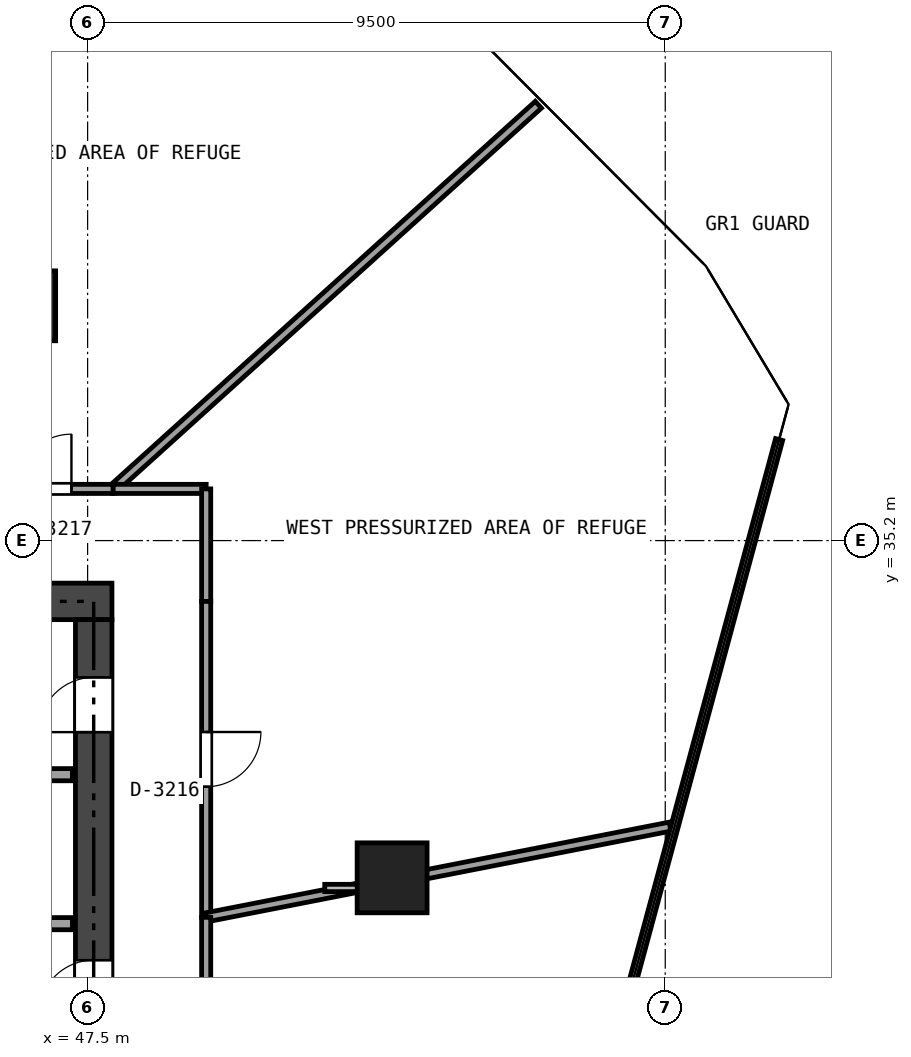
"""IFC4 building model, lengths in metres.
Left out: names, types, materials, properties, quantities, classifications, styles, units other than length and angle.
Written with IfcOpenShell. Run it as: python <this file> out.ifc"""

import sys

from ifc_helpers import new_model, si_unit, direction, frame, frame_2d, origin, origin_2d, place, context, subcontext, project, spatial, rectangle, extrude, element, fill, save


model = new_model("IFC4")
c1 = context("Model", 3, precision=1e-05, world=origin(), true_north=direction((0.0, 1.0)))
c2 = subcontext(c1, "Body", "Model", "MODEL_VIEW")
j1 = project(units=[si_unit("LENGTHUNIT", "METRE"), si_unit("PLANEANGLEUNIT", "RADIAN")], contexts=[c1])
p1 = place(None, origin())
s1 = spatial("IfcSite", under=j1, at=p1, CompositionType="ELEMENT")
p2 = place(p1, origin())
s2 = spatial("IfcBuilding", under=s1, at=p2, CompositionType="ELEMENT")
p3 = place(p2, frame((0.0, 0.0, 121.2)))
s3 = spatial("IfcBuildingStorey", under=s2, at=p3, CompositionType="ELEMENT", Elevation=121.2)
p4 = place(p3, frame((26.5, 34.2, 0.0), z_axis=(0.0, 0.0, 1.0), x_axis=(1.0, 0.0, 0.0)))
e1 = element("IfcWall", 1, at=p4, inside=s3, PredefinedType="SHEAR", context=c2, shape_type="SweptSolid", body=[
    extrude(rectangle(XDim=21.4, YDim=0.6, at=frame_2d((10.7, 0.0))), origin(), (0.0, 0.0, 1.0), 4.08),
])
p5 = place(p4, frame((9.7, 0.0, 0.0)))
e2 = element("IfcOpeningElement", 2, at=p5, cuts=e1, PredefinedType="OPENING", context=c2, shape_type="SweptSolid", body=[
    extrude(rectangle(XDim=1.1, YDim=2.15, at=frame_2d((0.55, 1.075))), frame((0.0, 0.31, 0.0), z_axis=(0.0, -1.0, 0.0), x_axis=(1.0, 0.0, 0.0)), (0.0, 0.0, 1.0), 0.62),
])
p6 = place(p4, frame((1.95, 0.0, 0.0)))
e3 = element("IfcOpeningElement", 3, at=p6, cuts=e1, PredefinedType="OPENING", context=c2, shape_type="SweptSolid", body=[
    extrude(rectangle(XDim=0.9, YDim=2.1, at=frame_2d((0.45, 1.05))), frame((0.0, 0.31, 0.0), z_axis=(0.0, -1.0, 0.0), x_axis=(1.0, 0.0, 0.0)), (0.0, 0.0, 1.0), 0.62),
])
p7 = place(p4, frame((6.25, 0.0, 0.0)))
e4 = element("IfcOpeningElement", 4, at=p7, cuts=e1, PredefinedType="OPENING", context=c2, shape_type="SweptSolid", body=[
    extrude(rectangle(XDim=0.9, YDim=2.1, at=frame_2d((0.45, 1.05))), frame((0.0, 0.31, 0.0), z_axis=(0.0, -1.0, 0.0), x_axis=(1.0, 0.0, 0.0)), (0.0, 0.0, 1.0), 0.62),
])
p8 = place(p3, frame((47.6, 18.9, 0.0), z_axis=(0.0, 0.0, 1.0), x_axis=(0.0, 1.0, 0.0)))
e5 = element("IfcWall", 5, at=p8, inside=s3, PredefinedType="SHEAR", context=c2, shape_type="SweptSolid", body=[
    extrude(rectangle(XDim=15.0, YDim=0.6, at=frame_2d((7.5, 0.0))), origin(), (0.0, 0.0, 1.0), 4.08),
])
p9 = place(p8, frame((6.6, 0.0, 0.0)))
e6 = element("IfcOpeningElement", 6, at=p9, cuts=e5, PredefinedType="OPENING", context=c2, shape_type="SweptSolid", body=[
    extrude(rectangle(XDim=1.1, YDim=2.15, at=frame_2d((0.55, 1.075))), frame((0.0, 0.31, 0.0), z_axis=(0.0, -1.0, 0.0), x_axis=(1.0, 0.0, 0.0)), (0.0, 0.0, 1.0), 0.62),
])
p10 = place(p8, frame((8.5, 0.0, 0.0)))
e7 = element("IfcOpeningElement", 7, at=p10, cuts=e5, PredefinedType="OPENING", context=c2, shape_type="SweptSolid", body=[
    extrude(rectangle(XDim=0.9, YDim=2.1, at=frame_2d((0.45, 1.05))), frame((0.0, 0.31, 0.0), z_axis=(0.0, -1.0, 0.0), x_axis=(1.0, 0.0, 0.0)), (0.0, 0.0, 1.0), 0.62),
])
p11 = place(p8, frame((13.15, 0.0, 0.0)))
e8 = element("IfcOpeningElement", 8, at=p11, cuts=e5, PredefinedType="OPENING", context=c2, shape_type="SweptSolid", body=[
    extrude(rectangle(XDim=0.9, YDim=2.1, at=frame_2d((0.45, 1.05))), frame((0.0, 0.31, 0.0), z_axis=(0.0, -1.0, 0.0), x_axis=(1.0, 0.0, 0.0)), (0.0, 0.0, 1.0), 0.62),
])
for number, where, z_axis, x_axis in (
    (9, (52.508, 29.654, 0.0), (0.0, 0.0, 1.0), (1.0, 0.0, 0.0)),
    (10, (46.399, 39.061, 0.0), (0.0, 0.0, 1.0), (1.0, 0.0, 0.0)),
):
    element("IfcColumn", number, at=place(p3, frame(where, z_axis=z_axis, x_axis=x_axis)), inside=s3, PredefinedType="COLUMN", context=c2, shape_type="SweptSolid", body=[
        extrude(rectangle(XDim=1.15, YDim=1.15, at=origin_2d()), origin(), (0.0, 0.0, 1.0), 4.08),
    ])
p12 = place(p3, frame((43.9, 28.9, 0.0), z_axis=(0.0, 0.0, 1.0), x_axis=(1.0, 0.0, 0.0)))
e11 = element("IfcWall", 11, at=p12, inside=s3, PredefinedType="SOLIDWALL", context=c2, shape_type="SweptSolid", body=[
    extrude(rectangle(XDim=3.35, YDim=0.2, at=frame_2d((1.675, 0.0))), origin(), (0.0, 0.0, 1.0), 4.08),
])
p13 = place(p12, frame((1.15, 0.0, 0.0)))
e12 = element("IfcOpeningElement", 12, at=p13, cuts=e11, PredefinedType="OPENING", context=c2, shape_type="SweptSolid", body=[
    extrude(rectangle(XDim=0.9, YDim=2.1, at=frame_2d((0.45, 1.05))), frame((0.0, 0.11, 0.0), z_axis=(0.0, -1.0, 0.0), x_axis=(1.0, 0.0, 0.0)), (0.0, 0.0, 1.0), 0.22),
])
p14 = place(p3, frame((43.9, 31.35, 0.0), z_axis=(0.0, 0.0, 1.0), x_axis=(1.0, 0.0, 0.0)))
e13 = element("IfcWall", 13, at=p14, inside=s3, PredefinedType="SOLIDWALL", context=c2, shape_type="SweptSolid", body=[
    extrude(rectangle(XDim=3.35, YDim=0.2, at=frame_2d((1.675, 0.0))), origin(), (0.0, 0.0, 1.0), 4.08),
])
p15 = place(p3, frame((54.913, 42.368, 0.0), z_axis=(0.0, 0.0, 1.0), x_axis=(-0.742164975515, -0.670217240242, 0.0)))
e14 = element("IfcWall", 14, at=p15, inside=s3, PredefinedType="PARTITIONING", context=c2, shape_type="SweptSolid", body=[
    extrude(rectangle(XDim=9.427, YDim=0.15, at=frame_2d((4.713, 0.0))), origin(), (0.0, 0.0, 1.0), 3.365),
])
p16 = place(p3, frame((47.917, 36.05, 0.0), z_axis=(0.0, 0.0, 1.0), x_axis=(1.0, 0.0, 0.0)))
e15 = element("IfcWall", 15, at=p16, inside=s3, PredefinedType="PARTITIONING", context=c2, shape_type="SweptSolid", body=[
    extrude(rectangle(XDim=1.533, YDim=0.15, at=frame_2d((0.767, 0.0))), origin(), (0.0, 0.0, 1.0), 3.365),
])
p17 = place(p3, frame((49.45, 36.05, 0.0), z_axis=(0.0, 0.0, 1.0), x_axis=(0.0, -1.0, 0.0)))
e16 = element("IfcWall", 16, at=p17, inside=s3, PredefinedType="PARTITIONING", context=c2, shape_type="SweptSolid", body=[
    extrude(rectangle(XDim=1.85, YDim=0.15, at=frame_2d((0.925, 0.0))), origin(), (0.0, 0.0, 1.0), 3.365),
])
p18 = place(p3, frame((49.45, 34.2, 0.0), z_axis=(0.0, 0.0, 1.0), x_axis=(0.0, -1.0, 0.0)))
e17 = element("IfcWall", 17, at=p18, inside=s3, PredefinedType="PARTITIONING", context=c2, shape_type="SweptSolid", body=[
    extrude(rectangle(XDim=5.196, YDim=0.15, at=frame_2d((2.598, 0.0))), origin(), (0.0, 0.0, 1.0), 3.065),
])
p19 = place(p18, frame((2.148, 0.0, 0.0)))
e18 = element("IfcOpeningElement", 18, at=p19, cuts=e17, PredefinedType="OPENING", context=c2, shape_type="SweptSolid", body=[
    extrude(rectangle(XDim=0.9, YDim=2.0, at=frame_2d((0.45, 1.0))), frame((0.0, 0.085, 0.0), z_axis=(0.0, -1.0, 0.0), x_axis=(1.0, 0.0, 0.0)), (0.0, 0.0, 1.0), 0.17),
])
p20 = place(p3, frame((49.45, 29.004, 0.0), z_axis=(0.0, 0.0, 1.0), x_axis=(0.981404103345, 0.191953082647, 0.0)))
e19 = element("IfcWall", 19, at=p20, inside=s3, PredefinedType="PARTITIONING", context=c2, shape_type="SweptSolid", body=[
    extrude(rectangle(XDim=7.774, YDim=0.15, at=frame_2d((3.887, 0.0))), origin(), (0.0, 0.0, 1.0), 3.065),
])
p21 = place(p3, frame((40.335, 36.05, 0.0), z_axis=(0.0, 0.0, 1.0), x_axis=(1.0, 0.0, 0.0)))
e20 = element("IfcWall", 20, at=p21, inside=s3, PredefinedType="PARTITIONING", context=c2, shape_type="SweptSolid", body=[
    extrude(rectangle(XDim=7.582, YDim=0.15, at=frame_2d((3.791, 0.0))), origin(), (0.0, 0.0, 1.0), 3.065),
])
p22 = place(p21, frame((5.999, 0.0, 0.0)))
e21 = element("IfcOpeningElement", 21, at=p22, cuts=e20, PredefinedType="OPENING", context=c2, shape_type="SweptSolid", body=[
    extrude(rectangle(XDim=0.9, YDim=2.0, at=frame_2d((0.45, 1.0))), frame((0.0, 0.085, 0.0), z_axis=(0.0, -1.0, 0.0), x_axis=(1.0, 0.0, 0.0)), (0.0, 0.0, 1.0), 0.17),
])
p23 = place(p3, frame((49.45, 29.004, 0.0), z_axis=(0.0, 0.0, 1.0), x_axis=(0.0, -1.0, 0.0)))
e22 = element("IfcWall", 22, at=p23, inside=s3, PredefinedType="PARTITIONING", context=c2, shape_type="SweptSolid", body=[
    extrude(rectangle(XDim=6.584, YDim=0.15, at=frame_2d((3.292, 0.0))), origin(), (0.0, 0.0, 1.0), 3.065),
])
p24 = place(p23, frame((2.842, 0.0, 0.0)))
e23 = element("IfcOpeningElement", 23, at=p24, cuts=e22, PredefinedType="OPENING", context=c2, shape_type="SweptSolid", body=[
    extrude(rectangle(XDim=0.9, YDim=2.0, at=frame_2d((0.45, 1.0))), frame((0.0, 0.085, 0.0), z_axis=(0.0, -1.0, 0.0), x_axis=(1.0, 0.0, 0.0)), (0.0, 0.0, 1.0), 0.17),
])
p25 = place(p10, origin())
e24 = element("IfcDoor", 24, at=p25, inside=s3, OperationType="SINGLE_SWING_LEFT", PredefinedType="DOOR", context=c2, shape_type="SweptSolid", body=[
    extrude(rectangle(XDim=0.9, YDim=2.1, at=frame_2d((0.45, 1.05))), frame((0.0, 0.025, 0.0), z_axis=(0.0, -1.0, 0.0), x_axis=(1.0, 0.0, 0.0)), (0.0, 0.0, 1.0), 0.05),
])
fill(e7, e24)
p26 = place(p11, origin())
e25 = element("IfcDoor", 25, at=p26, inside=s3, OperationType="SINGLE_SWING_LEFT", PredefinedType="DOOR", context=c2, shape_type="SweptSolid", body=[
    extrude(rectangle(XDim=0.9, YDim=2.1, at=frame_2d((0.45, 1.05))), frame((0.0, 0.025, 0.0), z_axis=(0.0, -1.0, 0.0), x_axis=(1.0, 0.0, 0.0)), (0.0, 0.0, 1.0), 0.05),
])
fill(e8, e25)
p27 = place(p19, origin())
e26 = element("IfcDoor", 26, at=p27, inside=s3, OperationType="SINGLE_SWING_LEFT", PredefinedType="DOOR", context=c2, shape_type="SweptSolid", body=[
    extrude(rectangle(XDim=0.9, YDim=2.0, at=frame_2d((0.45, 1.0))), frame((0.0, 0.025, 0.0), z_axis=(0.0, -1.0, 0.0), x_axis=(1.0, 0.0, 0.0)), (0.0, 0.0, 1.0), 0.05),
])
fill(e18, e26)
p28 = place(p22, origin())
e27 = element("IfcDoor", 27, at=p28, inside=s3, OperationType="SINGLE_SWING_RIGHT", PredefinedType="DOOR", context=c2, shape_type="SweptSolid", body=[
    extrude(rectangle(XDim=0.9, YDim=2.0, at=frame_2d((0.45, 1.0))), frame((0.0, 0.025, 0.0), z_axis=(0.0, -1.0, 0.0), x_axis=(1.0, 0.0, 0.0)), (0.0, 0.0, 1.0), 0.05),
])
fill(e21, e27)
save(model, sys.argv[1])
